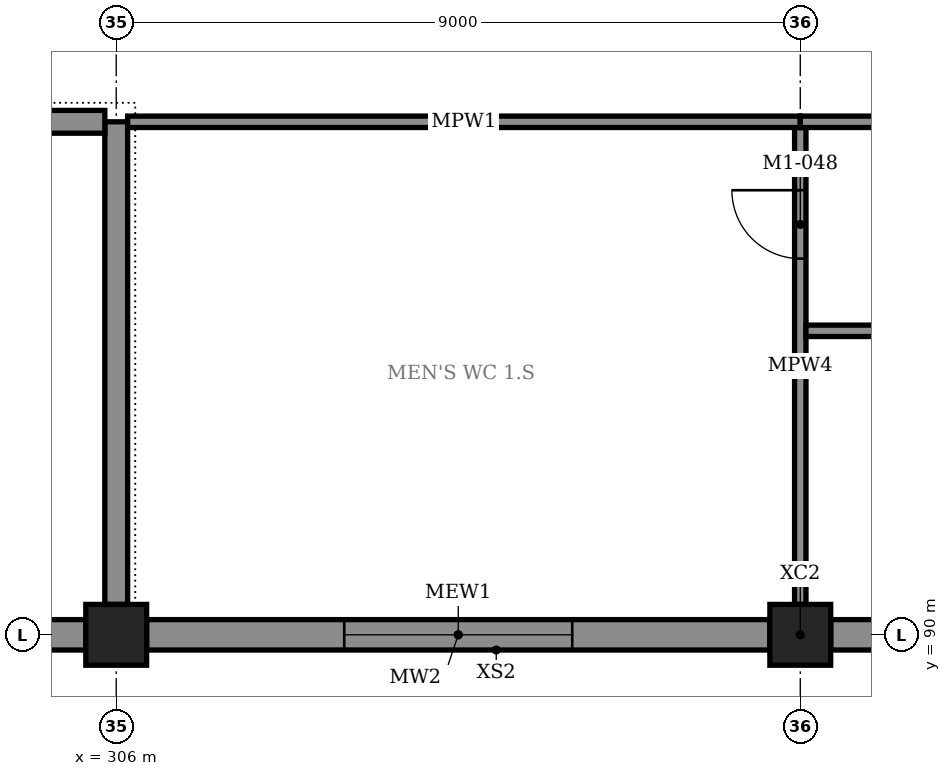
"""IFC4 building model, lengths in metres.
Left out: names, types, materials, properties, quantities, classifications, styles, units other than length and angle.
Written with IfcOpenShell. Run it as: python <this file> out.ifc"""

import sys

from ifc_helpers import new_model, si_unit, direction, frame, frame_2d, origin, origin_2d, place, context, subcontext, project, spatial, rectangle, extrude, element, fill, save


model = new_model("IFC4")
c1 = context("Model", 3, precision=1e-05, world=origin(), true_north=direction((0.0, 1.0)))
c2 = subcontext(c1, "Body", "Model", "MODEL_VIEW")
j1 = project(units=[si_unit("LENGTHUNIT", "METRE"), si_unit("PLANEANGLEUNIT", "RADIAN")], contexts=[c1])
p1 = place(None, origin())
s1 = spatial("IfcSite", under=j1, at=p1, CompositionType="ELEMENT")
p2 = place(p1, origin())
s2 = spatial("IfcBuilding", under=s1, at=p2, CompositionType="ELEMENT")
p3 = place(p2, frame((0.0, 0.0, 6.0)))
s3 = spatial("IfcBuildingStorey", under=s2, at=p3, CompositionType="ELEMENT", Elevation=6.0)
for number, where, z_axis, x_axis in (
    (1, (306.0, 90.0, 0.0), (0.0, 0.0, 1.0), (1.0, 0.0, 0.0)),
    (2, (315.0, 90.0, 0.0), (0.0, 0.0, 1.0), (1.0, 0.0, 0.0)),
):
    element("IfcColumn", number, at=place(p3, frame(where, z_axis=z_axis, x_axis=x_axis)), inside=s3, PredefinedType="COLUMN", context=c2, shape_type="SweptSolid", body=[
        extrude(rectangle(XDim=0.8, YDim=0.8, at=origin_2d()), origin(), (0.0, 0.0, 1.0), 5.5),
    ])
p4 = place(p3, frame((297.4, 90.0, 0.0), z_axis=(0.0, 0.0, 1.0), x_axis=(1.0, 0.0, 0.0)))
e3 = element("IfcWall", 3, at=p4, inside=s3, PredefinedType="STANDARD", context=c2, shape_type="SweptSolid", body=[
    extrude(rectangle(XDim=8.2, YDim=0.4, at=frame_2d((4.1, 0.0))), origin(), (0.0, 0.0, 1.0), 4.32),
])
p5 = place(p4, frame((2.6, 0.0, 0.9)))
e4 = element("IfcOpeningElement", 4, at=p5, cuts=e3, PredefinedType="OPENING", context=c2, shape_type="SweptSolid", body=[
    extrude(rectangle(XDim=3.0, YDim=2.1, at=frame_2d((1.5, 1.05))), frame((0.0, 0.21, 0.0), z_axis=(0.0, -1.0, 0.0), x_axis=(1.0, 0.0, 0.0)), (0.0, 0.0, 1.0), 0.42),
])
p6 = place(p3, frame((306.4, 90.0, 0.0), z_axis=(0.0, 0.0, 1.0), x_axis=(1.0, 0.0, 0.0)))
e5 = element("IfcWall", 5, at=p6, inside=s3, PredefinedType="STANDARD", context=c2, shape_type="SweptSolid", body=[
    extrude(rectangle(XDim=8.2, YDim=0.4, at=frame_2d((4.1, 0.0))), origin(), (0.0, 0.0, 1.0), 4.32),
])
p7 = place(p6, frame((2.6, 0.0, 0.9)))
e6 = element("IfcOpeningElement", 6, at=p7, cuts=e5, PredefinedType="OPENING", context=c2, shape_type="SweptSolid", body=[
    extrude(rectangle(XDim=3.0, YDim=2.1, at=frame_2d((1.5, 1.05))), frame((0.0, 0.21, 0.0), z_axis=(0.0, -1.0, 0.0), x_axis=(1.0, 0.0, 0.0)), (0.0, 0.0, 1.0), 0.42),
])
p8 = place(p3, frame((315.4, 90.0, 0.0), z_axis=(0.0, 0.0, 1.0), x_axis=(1.0, 0.0, 0.0)))
e7 = element("IfcWall", 7, at=p8, inside=s3, PredefinedType="STANDARD", context=c2, shape_type="SweptSolid", body=[
    extrude(rectangle(XDim=8.2, YDim=0.4, at=frame_2d((4.1, 0.0))), origin(), (0.0, 0.0, 1.0), 4.32),
])
p9 = place(p8, frame((2.6, 0.0, 0.9)))
e8 = element("IfcOpeningElement", 8, at=p9, cuts=e7, PredefinedType="OPENING", context=c2, shape_type="SweptSolid", body=[
    extrude(rectangle(XDim=3.0, YDim=2.1, at=frame_2d((1.5, 1.05))), frame((0.0, 0.21, 0.0), z_axis=(0.0, -1.0, 0.0), x_axis=(1.0, 0.0, 0.0)), (0.0, 0.0, 1.0), 0.42),
])
p10 = place(p3, frame((306.0, 90.4, 0.0), z_axis=(0.0, 0.0, 1.0), x_axis=(0.0, 1.0, 0.0)))
e9 = element("IfcWall", 9, at=p10, inside=s3, PredefinedType="SHEAR", context=c2, shape_type="SweptSolid", body=[
    extrude(rectangle(XDim=6.35, YDim=0.3, at=frame_2d((3.175, 0.0))), origin(), (0.0, 0.0, 1.0), 5.22),
])
p11 = place(p3, frame((297.15, 96.75, 0.0), z_axis=(0.0, 0.0, 1.0), x_axis=(1.0, 0.0, 0.0)))
e10 = element("IfcWall", 10, at=p11, inside=s3, PredefinedType="SHEAR", context=c2, shape_type="SweptSolid", body=[
    extrude(rectangle(XDim=8.7, YDim=0.3, at=frame_2d((4.35, 0.0))), origin(), (0.0, 0.0, 1.0), 5.22),
])
p12 = place(p3, frame((306.15, 96.75, 0.0), z_axis=(0.0, 0.0, 1.0), x_axis=(1.0, 0.0, 0.0)))
e11 = element("IfcWall", 11, at=p12, inside=s3, PredefinedType="PARTITIONING", context=c2, shape_type="SweptSolid", body=[
    extrude(rectangle(XDim=8.85, YDim=0.15, at=frame_2d((4.425, 0.0))), origin(), (0.0, 0.0, 1.0), 4.32),
])
p13 = place(p3, frame((315.0, 90.4, 0.0), z_axis=(0.0, 0.0, 1.0), x_axis=(0.0, 1.0, 0.0)))
e12 = element("IfcWall", 12, at=p13, inside=s3, PredefinedType="PARTITIONING", context=c2, shape_type="SweptSolid", body=[
    extrude(rectangle(XDim=6.275, YDim=0.15, at=frame_2d((3.138, 0.0))), origin(), (0.0, 0.0, 1.0), 4.32),
])
p14 = place(p13, frame((4.55, 0.0, 0.0)))
e13 = element("IfcOpeningElement", 13, at=p14, cuts=e12, PredefinedType="OPENING", context=c2, shape_type="SweptSolid", body=[
    extrude(rectangle(XDim=0.9, YDim=2.1, at=frame_2d((0.45, 1.05))), frame((0.0, 0.085, 0.0), z_axis=(0.0, -1.0, 0.0), x_axis=(1.0, 0.0, 0.0)), (0.0, 0.0, 1.0), 0.17),
])
p15 = place(p3, frame((315.075, 94.0, 0.0), z_axis=(0.0, 0.0, 1.0), x_axis=(1.0, 0.0, 0.0)))
e14 = element("IfcWall", 14, at=p15, inside=s3, PredefinedType="PARTITIONING", context=c2, shape_type="SweptSolid", body=[
    extrude(rectangle(XDim=8.85, YDim=0.15, at=frame_2d((4.425, 0.0))), origin(), (0.0, 0.0, 1.0), 4.32),
])
p16 = place(p15, frame((3.875, 0.0, 0.0)))
e15 = element("IfcOpeningElement", 15, at=p16, cuts=e14, PredefinedType="OPENING", context=c2, shape_type="SweptSolid", body=[
    extrude(rectangle(XDim=1.1, YDim=2.1, at=frame_2d((0.55, 1.05))), frame((0.0, 0.085, 0.0), z_axis=(0.0, -1.0, 0.0), x_axis=(1.0, 0.0, 0.0)), (0.0, 0.0, 1.0), 0.17),
])
p17 = place(p3, frame((315.0, 96.75, 0.0), z_axis=(0.0, 0.0, 1.0), x_axis=(1.0, 0.0, 0.0)))
e16 = element("IfcWall", 16, at=p17, inside=s3, PredefinedType="PARTITIONING", context=c2, shape_type="SweptSolid", body=[
    extrude(rectangle(XDim=9.0, YDim=0.15, at=frame_2d((4.5, 0.0))), origin(), (0.0, 0.0, 1.0), 4.32),
])
p18 = place(p17, frame((4.0, 0.0, 0.0)))
e17 = element("IfcOpeningElement", 17, at=p18, cuts=e16, PredefinedType="OPENING", context=c2, shape_type="SweptSolid", body=[
    extrude(rectangle(XDim=1.0, YDim=2.4, at=frame_2d((0.5, 1.2))), frame((0.0, 0.085, 0.0), z_axis=(0.0, -1.0, 0.0), x_axis=(1.0, 0.0, 0.0)), (0.0, 0.0, 1.0), 0.17),
])
p19 = place(p7, origin())
e18 = element("IfcWindow", 18, at=p19, inside=s3, PartitioningType="TRIPLE_PANEL_VERTICAL", PredefinedType="WINDOW", context=c2, shape_type="SweptSolid", body=[
    extrude(rectangle(XDim=3.0, YDim=2.1, at=frame_2d((1.5, 1.05))), frame((0.0, 0.03, 0.0), z_axis=(0.0, -1.0, 0.0), x_axis=(1.0, 0.0, 0.0)), (0.0, 0.0, 1.0), 0.06),
])
fill(e6, e18)
p20 = place(p14, origin())
e19 = element("IfcDoor", 19, at=p20, inside=s3, OperationType="SINGLE_SWING_RIGHT", PredefinedType="DOOR", context=c2, shape_type="SweptSolid", body=[
    extrude(rectangle(XDim=0.9, YDim=2.1, at=frame_2d((0.45, 1.05))), frame((0.0, 0.025, 0.0), z_axis=(0.0, -1.0, 0.0), x_axis=(1.0, 0.0, 0.0)), (0.0, 0.0, 1.0), 0.05),
])
fill(e13, e19)
save(model, sys.argv[1])
